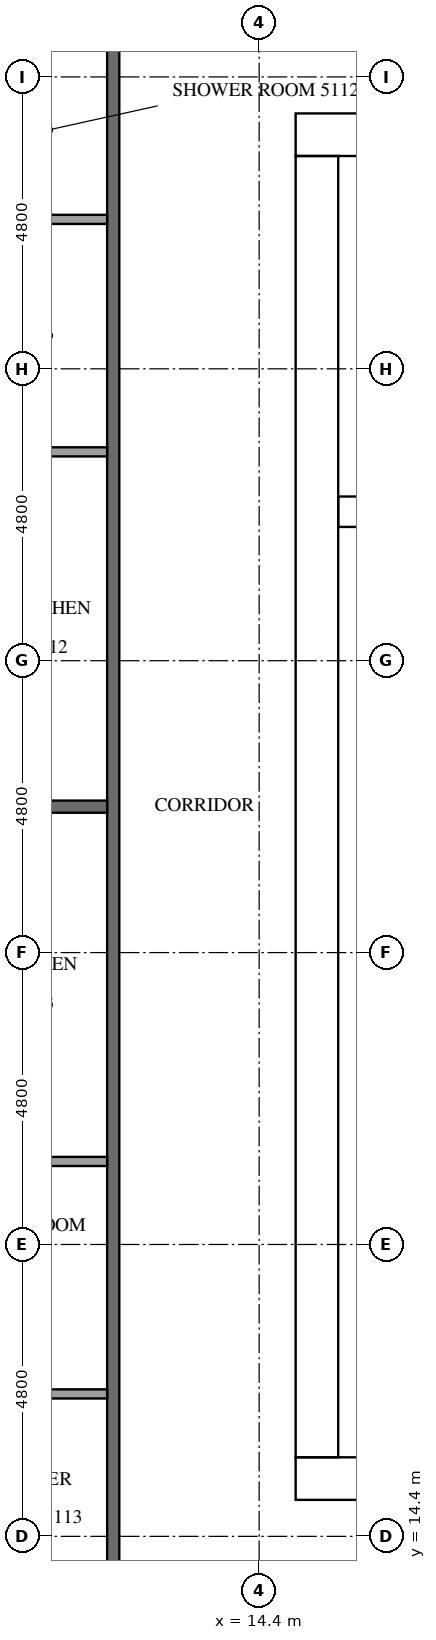
"""IFC4 building model, lengths in metres.
Left out: names, types, materials, properties, quantities, classifications, styles, units other than length and angle.
Written with IfcOpenShell. Run it as: python <this file> out.ifc"""

import sys

from ifc_helpers import new_model, si_unit, direction, frame, frame_2d, origin, place, context, subcontext, project, spatial, rectangle, extrude, element, fill, save


model = new_model("IFC4")
c1 = context("Model", 3, precision=1e-05, world=origin(), true_north=direction((0.0, 1.0)))
c2 = subcontext(c1, "Body", "Model", "MODEL_VIEW")
j1 = project(units=[si_unit("LENGTHUNIT", "METRE"), si_unit("PLANEANGLEUNIT", "RADIAN")], contexts=[c1])
p1 = place(None, origin())
s1 = spatial("IfcSite", under=j1, at=p1, CompositionType="ELEMENT")
p2 = place(p1, origin())
s2 = spatial("IfcBuilding", under=s1, at=p2, CompositionType="ELEMENT")
p3 = place(p2, frame((0.0, 0.0, 196.4)))
s3 = spatial("IfcBuildingStorey", under=s2, at=p3, CompositionType="ELEMENT", Elevation=196.4)
p4 = place(p3, frame((15.0, 15.35, 0.0), z_axis=(0.0, 0.0, 1.0), x_axis=(1.0, 0.0, 0.0)))
e1 = element("IfcWall", 1, at=p4, inside=s3, PredefinedType="SHEAR", context=c2, shape_type="SweptSolid", body=[
    extrude(rectangle(XDim=32.4, YDim=0.7, at=frame_2d((16.2, 0.0))), origin(), (0.0, 0.0, 1.0), 3.2),
])
p5 = place(p4, frame((15.3, 0.0, 0.0)))
e2 = element("IfcOpeningElement", 2, at=p5, cuts=e1, PredefinedType="OPENING", context=c2, shape_type="SweptSolid", body=[
    extrude(rectangle(XDim=1.8, YDim=2.1, at=frame_2d((0.9, 1.05))), frame((0.0, 0.36, 0.0), z_axis=(0.0, -1.0, 0.0), x_axis=(1.0, 0.0, 0.0)), (0.0, 0.0, 1.0), 0.72),
])
p6 = place(p3, frame((15.0, 37.45, 0.0), z_axis=(0.0, 0.0, 1.0), x_axis=(1.0, 0.0, 0.0)))
e3 = element("IfcWall", 3, at=p6, inside=s3, PredefinedType="SHEAR", context=c2, shape_type="SweptSolid", body=[
    extrude(rectangle(XDim=32.4, YDim=0.7, at=frame_2d((16.2, 0.0))), origin(), (0.0, 0.0, 1.0), 3.2),
])
p7 = place(p6, frame((15.3, 0.0, 0.0)))
e4 = element("IfcOpeningElement", 4, at=p7, cuts=e3, PredefinedType="OPENING", context=c2, shape_type="SweptSolid", body=[
    extrude(rectangle(XDim=1.8, YDim=2.1, at=frame_2d((0.9, 1.05))), frame((0.0, 0.36, 0.0), z_axis=(0.0, -1.0, 0.0), x_axis=(1.0, 0.0, 0.0)), (0.0, 0.0, 1.0), 0.72),
])
p8 = place(p6, frame((1.544, 0.0, 0.0)))
e5 = element("IfcOpeningElement", 5, at=p8, cuts=e3, PredefinedType="OPENING", context=c2, shape_type="SweptSolid", body=[
    extrude(rectangle(XDim=1.0, YDim=2.1, at=frame_2d((0.5, 1.05))), frame((0.0, 0.36, 0.0), z_axis=(0.0, -1.0, 0.0), x_axis=(1.0, 0.0, 0.0)), (0.0, 0.0, 1.0), 0.72),
])
p9 = place(p6, frame((5.219, 0.0, 0.0)))
e6 = element("IfcOpeningElement", 6, at=p9, cuts=e3, PredefinedType="OPENING", context=c2, shape_type="SweptSolid", body=[
    extrude(rectangle(XDim=1.0, YDim=2.1, at=frame_2d((0.5, 1.05))), frame((0.0, 0.36, 0.0), z_axis=(0.0, -1.0, 0.0), x_axis=(1.0, 0.0, 0.0)), (0.0, 0.0, 1.0), 0.72),
])
p10 = place(p3, frame((15.35, 15.7, 0.0), z_axis=(0.0, 0.0, 1.0), x_axis=(0.0, 1.0, 0.0)))
e7 = element("IfcWall", 7, at=p10, inside=s3, PredefinedType="SHEAR", context=c2, shape_type="SweptSolid", body=[
    extrude(rectangle(XDim=21.4, YDim=0.7, at=frame_2d((10.7, 0.0))), origin(), (0.0, 0.0, 1.0), 3.2),
])
p11 = place(p10, frame((5.06, 0.0, 0.0)))
e8 = element("IfcOpeningElement", 8, at=p11, cuts=e7, PredefinedType="OPENING", context=c2, shape_type="SweptSolid", body=[
    extrude(rectangle(XDim=1.2, YDim=2.1, at=frame_2d((0.6, 1.05))), frame((0.0, 0.36, 0.0), z_axis=(0.0, -1.0, 0.0), x_axis=(1.0, 0.0, 0.0)), (0.0, 0.0, 1.0), 0.72),
])
p12 = place(p3, frame((15.7, 31.25, 0.0), z_axis=(0.0, 0.0, 1.0), x_axis=(1.0, 0.0, 0.0)))
e9 = element("IfcWall", 9, at=p12, inside=s3, PredefinedType="SHEAR", context=c2, shape_type="SweptSolid", body=[
    extrude(rectangle(XDim=7.15, YDim=0.5, at=frame_2d((3.575, 0.0))), origin(), (0.0, 0.0, 1.0), 3.2),
])
p13 = place(p3, frame((12.0, 12.1, 0.0), z_axis=(0.0, 0.0, 1.0), x_axis=(0.0, 1.0, 0.0)))
e10 = element("IfcWall", 10, at=p13, inside=s3, PredefinedType="PARTITIONING", context=c2, shape_type="SweptSolid", body=[
    extrude(rectangle(XDim=28.6, YDim=0.2, at=frame_2d((14.3, 0.0))), origin(), (0.0, 0.0, 1.0), 3.2),
])
p14 = place(p13, frame((27.275, 0.0, 0.0)))
e11 = element("IfcOpeningElement", 11, at=p14, cuts=e10, PredefinedType="OPENING", context=c2, shape_type="SweptSolid", body=[
    extrude(rectangle(XDim=1.0, YDim=2.1, at=frame_2d((0.5, 1.05))), frame((0.0, 0.11, 0.0), z_axis=(0.0, -1.0, 0.0), x_axis=(1.0, 0.0, 0.0)), (0.0, 0.0, 1.0), 0.22),
])
p15 = place(p13, frame((0.325, 0.0, 0.0)))
e12 = element("IfcOpeningElement", 12, at=p15, cuts=e10, PredefinedType="OPENING", context=c2, shape_type="SweptSolid", body=[
    extrude(rectangle(XDim=1.0, YDim=2.1, at=frame_2d((0.5, 1.05))), frame((0.0, 0.11, 0.0), z_axis=(0.0, -1.0, 0.0), x_axis=(1.0, 0.0, 0.0)), (0.0, 0.0, 1.0), 0.22),
])
p16 = place(p3, frame((4.9, 26.4, 0.0), z_axis=(0.0, 0.0, 1.0), x_axis=(1.0, 0.0, 0.0)))
e13 = element("IfcWall", 13, at=p16, inside=s3, PredefinedType="PARTITIONING", context=c2, shape_type="SweptSolid", body=[
    extrude(rectangle(XDim=7.0, YDim=0.2, at=frame_2d((3.5, 0.0))), origin(), (0.0, 0.0, 1.0), 3.2),
])
for number, where, z_axis, x_axis in (
    (14, (11.9, 36.058, 0.0), (0.0, 0.0, 1.0), (-1.0, 0.0, 0.0)),
    (15, (11.9, 32.235, 0.0), (0.0, 0.0, 1.0), (-1.0, 0.0, 0.0)),
):
    element("IfcWall", number, at=place(p3, frame(where, z_axis=z_axis, x_axis=x_axis)), inside=s3, PredefinedType="PARTITIONING", context=c2, shape_type="SweptSolid", body=[
        extrude(rectangle(XDim=1.925, YDim=0.15, at=frame_2d((0.962, 0.0))), origin(), (0.0, 0.0, 1.0), 3.2),
    ])
for number, where, z_axis, x_axis in (
    (16, (11.9, 16.742, 0.0), (0.0, 0.0, 1.0), (-1.0, 0.0, 0.0)),
    (17, (11.9, 20.565, 0.0), (0.0, 0.0, 1.0), (-1.0, 0.0, 0.0)),
):
    element("IfcWall", number, at=place(p3, frame(where, z_axis=z_axis, x_axis=x_axis)), inside=s3, PredefinedType="PARTITIONING", context=c2, shape_type="SweptSolid", body=[
        extrude(rectangle(XDim=2.375, YDim=0.15, at=frame_2d((1.188, 0.0))), origin(), (0.0, 0.0, 1.0), 3.2),
    ])
p17 = place(p11, frame((1.2, 0.0, 0.0), z_axis=(0.0, 0.0, 1.0), x_axis=(-1.0, 0.0, 0.0)))
e18 = element("IfcDoor", 18, at=p17, inside=s3, OperationType="SINGLE_SWING_RIGHT", PredefinedType="DOOR", context=c2, shape_type="SweptSolid", body=[
    extrude(rectangle(XDim=1.2, YDim=2.1, at=frame_2d((0.6, 1.05))), frame((0.0, 0.025, 0.0), z_axis=(0.0, -1.0, 0.0), x_axis=(1.0, 0.0, 0.0)), (0.0, 0.0, 1.0), 0.05),
])
fill(e8, e18)
save(model, sys.argv[1])
